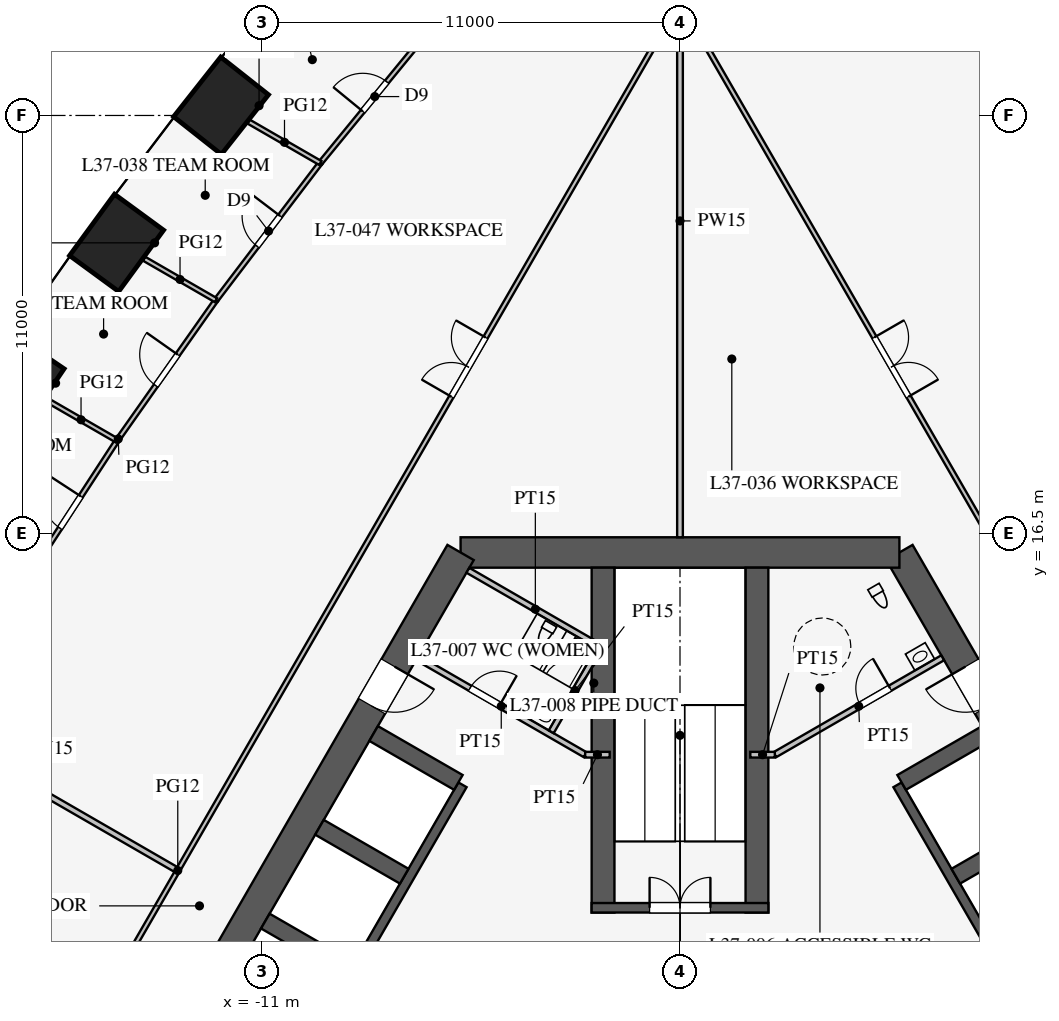
"""IFC4 building model, lengths in metres.
Left out: names, types, materials, properties, quantities, classifications, styles, units other than length and angle.
Written with IfcOpenShell. Run it as: python <this file> out.ifc"""

import sys

from ifc_helpers import new_model, si_unit, direction, frame, frame_2d, origin, origin_2d, place, context, subcontext, project, spatial, rectangle, extrude, element, fill, save


model = new_model("IFC4")
c1 = context("Model", 3, precision=1e-05, world=origin(), true_north=direction((0.0, 1.0)))
c2 = subcontext(c1, "Body", "Model", "MODEL_VIEW")
j1 = project(units=[si_unit("LENGTHUNIT", "METRE"), si_unit("PLANEANGLEUNIT", "RADIAN")], contexts=[c1])
p1 = place(None, origin())
s1 = spatial("IfcSite", under=j1, at=p1, CompositionType="ELEMENT")
p2 = place(p1, origin())
s2 = spatial("IfcBuilding", under=s1, at=p2, CompositionType="ELEMENT")
p3 = place(p2, frame((0.0, 0.0, 161.9)))
s3 = spatial("IfcBuildingStorey", under=s2, at=p3, CompositionType="ELEMENT", Elevation=161.9)
for number, where, z_axis, x_axis in (
    (1, (-12.077, 27.757, 0.0), (0.0, 0.0, 1.0), (-0.62, -0.785, 0.0)),
    (2, (-14.825, 24.148, 0.0), (0.0, 0.0, 1.0), (-0.591, -0.807, 0.0)),
    (3, (-17.43, 20.456, 0.0), (0.0, 0.0, 1.0), (-0.561, -0.828, 0.0)),
):
    element("IfcColumn", number, at=place(p3, frame(where, z_axis=z_axis, x_axis=x_axis)), inside=s3, PredefinedType="COLUMN", context=c2, shape_type="SweptSolid", body=[
        extrude(rectangle(XDim=2.0, YDim=1.6, at=origin_2d()), origin(), (0.0, 0.0, 1.0), 4.2),
    ])
p4 = place(p3, frame((16.743, -3.0, 0.0), z_axis=(0.0, 0.0, 1.0), x_axis=(-0.500002442456, 0.866023993627, 0.0)))
e4 = element("IfcWall", 4, at=p4, inside=s3, PredefinedType="SHEAR", context=c2, shape_type="SweptSolid", body=[
    extrude(rectangle(XDim=21.939, YDim=0.8, at=frame_2d((10.97, 0.0))), origin(), (0.0, 0.0, 1.0), 4.2),
])
p5 = place(p4, frame((17.27, 0.0, 0.0)))
e5 = element("IfcOpeningElement", 5, at=p5, cuts=e4, PredefinedType="OPENING", context=c2, shape_type="SweptSolid", body=[
    extrude(rectangle(XDim=1.2, YDim=2.1, at=frame_2d((0.6, 1.05))), frame((0.0, 0.41, 0.0), z_axis=(0.0, -1.0, 0.0), x_axis=(1.0, 0.0, 0.0)), (0.0, 0.0, 1.0), 0.82),
])
p6 = place(p4, frame((3.47, 0.0, 0.0)))
e6 = element("IfcOpeningElement", 6, at=p6, cuts=e4, PredefinedType="OPENING", context=c2, shape_type="SweptSolid", body=[
    extrude(rectangle(XDim=1.2, YDim=2.1, at=frame_2d((0.6, 1.05))), frame((0.0, 0.41, 0.0), z_axis=(0.0, -1.0, 0.0), x_axis=(1.0, 0.0, 0.0)), (0.0, 0.0, 1.0), 0.82),
])
p7 = place(p3, frame((5.773, 16.0, 0.0), z_axis=(0.0, 0.0, 1.0), x_axis=(-1.0, 0.0, 0.0)))
e7 = element("IfcWall", 7, at=p7, inside=s3, PredefinedType="SHEAR", context=c2, shape_type="SweptSolid", body=[
    extrude(rectangle(XDim=11.547, YDim=0.8, at=frame_2d((5.773, 0.0))), origin(), (0.0, 0.0, 1.0), 4.2),
])
p8 = place(p3, frame((-5.773, 16.0, 0.0), z_axis=(0.0, 0.0, 1.0), x_axis=(-0.500002442456, -0.866023993627, 0.0)))
e8 = element("IfcWall", 8, at=p8, inside=s3, PredefinedType="SHEAR", context=c2, shape_type="SweptSolid", body=[
    extrude(rectangle(XDim=21.939, YDim=0.8, at=frame_2d((10.97, 0.0))), origin(), (0.0, 0.0, 1.0), 4.2),
])
p9 = place(p8, frame((17.27, 0.0, 0.0)))
e9 = element("IfcOpeningElement", 9, at=p9, cuts=e8, PredefinedType="OPENING", context=c2, shape_type="SweptSolid", body=[
    extrude(rectangle(XDim=1.2, YDim=2.1, at=frame_2d((0.6, 1.05))), frame((0.0, 0.41, 0.0), z_axis=(0.0, -1.0, 0.0), x_axis=(1.0, 0.0, 0.0)), (0.0, 0.0, 1.0), 0.82),
])
p10 = place(p8, frame((3.47, 0.0, 0.0)))
e10 = element("IfcOpeningElement", 10, at=p10, cuts=e8, PredefinedType="OPENING", context=c2, shape_type="SweptSolid", body=[
    extrude(rectangle(XDim=1.2, YDim=2.1, at=frame_2d((0.6, 1.05))), frame((0.0, 0.41, 0.0), z_axis=(0.0, -1.0, 0.0), x_axis=(1.0, 0.0, 0.0)), (0.0, 0.0, 1.0), 0.82),
])
p11 = place(p3, frame((11.424, 0.014, 0.0), z_axis=(0.0, 0.0, 1.0), x_axis=(-0.500001763848, 0.866024385424, 0.0)))
e11 = element("IfcWall", 11, at=p11, inside=s3, PredefinedType="SHEAR", context=c2, shape_type="SweptSolid", body=[
    extrude(rectangle(XDim=11.4, YDim=0.25, at=frame_2d((5.7, 0.0))), origin(), (0.0, 0.0, 1.0), 4.2),
])
p12 = place(p11, frame((0.975, 0.0, 0.0)))
e12 = element("IfcOpeningElement", 12, at=p12, cuts=e11, PredefinedType="OPENING", context=c2, shape_type="SweptSolid", body=[
    extrude(rectangle(XDim=0.9, YDim=2.1, at=frame_2d((0.45, 1.05))), frame((0.0, 0.135, 0.0), z_axis=(0.0, -1.0, 0.0), x_axis=(1.0, 0.0, 0.0)), (0.0, 0.0, 1.0), 0.27),
])
p13 = place(p11, frame((3.825, 0.0, 0.0)))
e13 = element("IfcOpeningElement", 13, at=p13, cuts=e11, PredefinedType="OPENING", context=c2, shape_type="SweptSolid", body=[
    extrude(rectangle(XDim=0.9, YDim=2.1, at=frame_2d((0.45, 1.05))), frame((0.0, 0.135, 0.0), z_axis=(0.0, -1.0, 0.0), x_axis=(1.0, 0.0, 0.0)), (0.0, 0.0, 1.0), 0.27),
])
p14 = place(p3, frame((7.257, 7.481, 0.0), z_axis=(0.0, 0.0, 1.0), x_axis=(0.866046643894, 0.499963209246, 0.0)))
e14 = element("IfcWall", 14, at=p14, inside=s3, PredefinedType="SHEAR", context=c2, shape_type="SweptSolid", body=[
    extrude(rectangle(XDim=2.575, YDim=0.45, at=frame_2d((1.288, 0.0))), origin(), (0.0, 0.0, 1.0), 4.2),
])
p15 = place(p3, frame((5.832, 9.949, 0.0), z_axis=(0.0, 0.0, 1.0), x_axis=(0.866029291668, 0.499993265928, 0.0)))
e15 = element("IfcWall", 15, at=p15, inside=s3, PredefinedType="SHEAR", context=c2, shape_type="SweptSolid", body=[
    extrude(rectangle(XDim=2.575, YDim=0.45, at=frame_2d((1.288, 0.0))), origin(), (0.0, 0.0, 1.0), 4.2),
])
p16 = place(p3, frame((-5.724, 9.886, 0.0), z_axis=(0.0, 0.0, 1.0), x_axis=(-0.500001763848, -0.866024385424, 0.0)))
e16 = element("IfcWall", 16, at=p16, inside=s3, PredefinedType="SHEAR", context=c2, shape_type="SweptSolid", body=[
    extrude(rectangle(XDim=11.4, YDim=0.25, at=frame_2d((5.7, 0.0))), origin(), (0.0, 0.0, 1.0), 4.2),
])
p17 = place(p16, frame((6.525, 0.0, 0.0)))
e17 = element("IfcOpeningElement", 17, at=p17, cuts=e16, PredefinedType="OPENING", context=c2, shape_type="SweptSolid", body=[
    extrude(rectangle(XDim=1.2, YDim=2.2, at=frame_2d((0.6, 1.1))), frame((0.0, 0.135, 0.0), z_axis=(0.0, -1.0, 0.0), x_axis=(1.0, 0.0, 0.0)), (0.0, 0.0, 1.0), 0.27),
])
p18 = place(p16, frame((9.375, 0.0, 0.0)))
e18 = element("IfcOpeningElement", 18, at=p18, cuts=e16, PredefinedType="OPENING", context=c2, shape_type="SweptSolid", body=[
    extrude(rectangle(XDim=1.2, YDim=2.2, at=frame_2d((0.6, 1.1))), frame((0.0, 0.135, 0.0), z_axis=(0.0, -1.0, 0.0), x_axis=(1.0, 0.0, 0.0)), (0.0, 0.0, 1.0), 0.27),
])
p19 = place(p3, frame((-5.832, 9.949, 0.0), z_axis=(0.0, 0.0, 1.0), x_axis=(-0.866029291668, 0.499993265928, 0.0)))
e19 = element("IfcWall", 19, at=p19, inside=s3, PredefinedType="SHEAR", context=c2, shape_type="SweptSolid", body=[
    extrude(rectangle(XDim=2.575, YDim=0.45, at=frame_2d((1.288, 0.0))), origin(), (0.0, 0.0, 1.0), 4.2),
])
for number, where, z_axis, x_axis in (
    (20, (-7.257, 7.481, 0.0), (0.0, 0.0, 1.0), (-0.866, 0.5, 0.0)),
    (21, (-8.682, 5.012, 0.0), (0.0, 0.0, 1.0), (-0.866, 0.5, 0.0)),
):
    element("IfcWall", number, at=place(p3, frame(where, z_axis=z_axis, x_axis=x_axis)), inside=s3, PredefinedType="SHEAR", context=c2, shape_type="SweptSolid", body=[
        extrude(rectangle(XDim=2.575, YDim=0.45, at=frame_2d((1.288, 0.0))), origin(), (0.0, 0.0, 1.0), 4.2),
    ])
for number, where, z_axis, x_axis in (
    (22, (2.025, 6.525, 0.0), (0.0, 0.0, 1.0), (0.0, 1.0, 0.0)),
    (23, (-2.025, 6.525, 0.0), (0.0, 0.0, 1.0), (0.0, 1.0, 0.0)),
):
    element("IfcWall", number, at=place(p3, frame(where, z_axis=z_axis, x_axis=x_axis)), inside=s3, PredefinedType="SHEAR", context=c2, shape_type="SweptSolid", body=[
        extrude(rectangle(XDim=9.075, YDim=0.6, at=frame_2d((4.538, 0.0))), origin(), (0.0, 0.0, 1.0), 4.2),
    ])
p20 = place(p3, frame((2.325, 6.65, 0.0), z_axis=(0.0, 0.0, 1.0), x_axis=(-1.0, 0.0, 0.0)))
e24 = element("IfcWall", 24, at=p20, inside=s3, PredefinedType="SHEAR", context=c2, shape_type="SweptSolid", body=[
    extrude(rectangle(XDim=4.65, YDim=0.25, at=frame_2d((2.325, 0.0))), origin(), (0.0, 0.0, 1.0), 4.2),
])
p21 = place(p20, frame((1.525, 0.0, 0.0)))
e25 = element("IfcOpeningElement", 25, at=p21, cuts=e24, PredefinedType="OPENING", context=c2, shape_type="SweptSolid", body=[
    extrude(rectangle(XDim=1.6, YDim=2.1, at=frame_2d((0.8, 1.05))), frame((0.0, 0.135, 0.0), z_axis=(0.0, -1.0, 0.0), x_axis=(1.0, 0.0, 0.0)), (0.0, 0.0, 1.0), 0.27),
])
p22 = place(p3, frame((2.495, 10.678, 0.0), z_axis=(0.0, 0.0, 1.0), x_axis=(0.86602216432, 0.500005610874, 0.0)))
e26 = element("IfcWall", 26, at=p22, inside=s3, PredefinedType="PARTITIONING", context=c2, shape_type="SweptSolid", body=[
    extrude(rectangle(XDim=5.1, YDim=0.15, at=frame_2d((2.55, 0.0))), origin(), (0.0, 0.0, 1.0), 4.0),
])
p23 = place(p22, frame((2.6, 0.0, 0.0)))
e27 = element("IfcOpeningElement", 27, at=p23, cuts=e26, PredefinedType="OPENING", context=c2, shape_type="SweptSolid", body=[
    extrude(rectangle(XDim=0.9, YDim=2.1, at=frame_2d((0.45, 1.05))), frame((0.0, 0.085, 0.0), z_axis=(0.0, -1.0, 0.0), x_axis=(1.0, 0.0, 0.0)), (0.0, 0.0, 1.0), 0.17),
])
p24 = place(p3, frame((-2.495, 10.678, 0.0), z_axis=(0.0, 0.0, 1.0), x_axis=(-0.86602216432, 0.500005610874, 0.0)))
e28 = element("IfcWall", 28, at=p24, inside=s3, PredefinedType="PARTITIONING", context=c2, shape_type="SweptSolid", body=[
    extrude(rectangle(XDim=5.1, YDim=0.15, at=frame_2d((2.55, 0.0))), origin(), (0.0, 0.0, 1.0), 4.0),
])
p25 = place(p24, frame((2.6, 0.0, 0.0)))
e29 = element("IfcOpeningElement", 29, at=p25, cuts=e28, PredefinedType="OPENING", context=c2, shape_type="SweptSolid", body=[
    extrude(rectangle(XDim=0.9, YDim=2.1, at=frame_2d((0.45, 1.05))), frame((0.0, 0.085, 0.0), z_axis=(0.0, -1.0, 0.0), x_axis=(1.0, 0.0, 0.0)), (0.0, 0.0, 1.0), 0.17),
])
for number, where, z_axis, x_axis in (
    (30, (2.495, 10.678, 0.0), (0.0, 0.0, 1.0), (-1.0, 0.0, 0.0)),
    (31, (-2.495, 10.678, 0.0), (0.0, 0.0, 1.0), (1.0, 0.0, 0.0)),
):
    element("IfcWall", number, at=place(p3, frame(where, z_axis=z_axis, x_axis=x_axis)), inside=s3, PredefinedType="PARTITIONING", context=c2, shape_type="SweptSolid", body=[
        extrude(rectangle(XDim=0.645, YDim=0.15, at=frame_2d((0.323, 0.0))), origin(), (0.0, 0.0, 1.0), 4.0),
    ])
p26 = place(p3, frame((-2.031, 13.482, 0.0), z_axis=(0.0, 0.0, 1.0), x_axis=(-0.866050731258, 0.499956128963, 0.0)))
e32 = element("IfcWall", 32, at=p26, inside=s3, PredefinedType="PARTITIONING", context=c2, shape_type="SweptSolid", body=[
    extrude(rectangle(XDim=4.1, YDim=0.15, at=frame_2d((2.05, 0.0))), origin(), (0.0, 0.0, 1.0), 4.0),
])
p27 = place(p3, frame((-3.389, 11.281, 0.0), z_axis=(0.0, 0.0, 1.0), x_axis=(0.499989096993, 0.866031698547, 0.0)))
e33 = element("IfcWall", 33, at=p27, inside=s3, PredefinedType="PARTITIONING", context=c2, shape_type="SweptSolid", body=[
    extrude(rectangle(XDim=2.51, YDim=0.15, at=frame_2d((1.255, 0.0))), origin(), (0.0, 0.0, 1.0), 4.0),
])
p28 = place(p3, frame((0.0, 16.4, 0.0), z_axis=(0.0, 0.0, 1.0), x_axis=(0.0, 1.0, 0.0)))
e34 = element("IfcWall", 34, at=p28, inside=s3, PredefinedType="PARTITIONING", context=c2, shape_type="SweptSolid", body=[
    extrude(rectangle(XDim=16.65, YDim=0.15, at=frame_2d((8.325, 0.0))), origin(), (0.0, 0.0, 1.0), 2.3),
])
p29 = place(p3, frame((26.415, -15.231, 0.0), z_axis=(0.0, 0.0, 1.0), x_axis=(-0.50000091641, 0.866024874695, 0.0)))
e35 = element("IfcWall", 35, at=p29, inside=s3, PredefinedType="PARTITIONING", context=c2, shape_type="SweptSolid", body=[
    extrude(rectangle(XDim=52.796, YDim=0.12, at=frame_2d((26.398, 0.0))), origin(), (0.0, 0.0, 1.0), 2.9),
])
p30 = place(p29, frame((10.2, 0.0, 0.15)))
e36 = element("IfcOpeningElement", 36, at=p30, cuts=e35, PredefinedType="OPENING", context=c2, shape_type="SweptSolid", body=[
    extrude(rectangle(XDim=1.8, YDim=2.1, at=frame_2d((0.9, 1.05))), frame((0.0, 0.07, 0.0), z_axis=(0.0, -1.0, 0.0), x_axis=(1.0, 0.0, 0.0)), (0.0, 0.0, 1.0), 0.14),
])
p31 = place(p29, frame((40.8, 0.0, 0.15)))
e37 = element("IfcOpeningElement", 37, at=p31, cuts=e35, PredefinedType="OPENING", context=c2, shape_type="SweptSolid", body=[
    extrude(rectangle(XDim=1.8, YDim=2.1, at=frame_2d((0.9, 1.05))), frame((0.0, 0.07, 0.0), z_axis=(0.0, -1.0, 0.0), x_axis=(1.0, 0.0, 0.0)), (0.0, 0.0, 1.0), 0.14),
])
p32 = place(p3, frame((-13.268, 7.66, 0.0), z_axis=(0.0, 0.0, 1.0), x_axis=(-0.866013963754, 0.500019814191, 0.0)))
e38 = element("IfcWall", 38, at=p32, inside=s3, PredefinedType="PARTITIONING", context=c2, shape_type="SweptSolid", body=[
    extrude(rectangle(XDim=9.5, YDim=0.15, at=frame_2d((4.75, 0.0))), origin(), (0.0, 0.0, 1.0), 2.8),
])
p33 = place(p3, frame((-0.016, 30.491, 0.0), z_axis=(0.0, 0.0, 1.0), x_axis=(-0.50000091641, -0.866024874695, 0.0)))
e39 = element("IfcWall", 39, at=p33, inside=s3, PredefinedType="PARTITIONING", context=c2, shape_type="SweptSolid", body=[
    extrude(rectangle(XDim=52.796, YDim=0.12, at=frame_2d((26.398, 0.0))), origin(), (0.0, 0.0, 1.0), 2.9),
])
p34 = place(p33, frame((10.2, 0.0, 0.15)))
e40 = element("IfcOpeningElement", 40, at=p34, cuts=e39, PredefinedType="OPENING", context=c2, shape_type="SweptSolid", body=[
    extrude(rectangle(XDim=1.8, YDim=2.1, at=frame_2d((0.9, 1.05))), frame((0.0, 0.07, 0.0), z_axis=(0.0, -1.0, 0.0), x_axis=(1.0, 0.0, 0.0)), (0.0, 0.0, 1.0), 0.14),
])
p35 = place(p33, frame((40.8, 0.0, 0.15)))
e41 = element("IfcOpeningElement", 41, at=p35, cuts=e39, PredefinedType="OPENING", context=c2, shape_type="SweptSolid", body=[
    extrude(rectangle(XDim=1.8, YDim=2.1, at=frame_2d((0.9, 1.05))), frame((0.0, 0.07, 0.0), z_axis=(0.0, -1.0, 0.0), x_axis=(1.0, 0.0, 0.0)), (0.0, 0.0, 1.0), 0.14),
])
p36 = place(p3, frame((-12.21, 22.638, 0.0), z_axis=(0.0, 0.0, 1.0), x_axis=(-0.575987178736, -0.817458726745, 0.0)))
e42 = element("IfcWall", 42, at=p36, inside=s3, PredefinedType="PARTITIONING", context=c2, shape_type="SweptSolid", body=[
    extrude(rectangle(XDim=4.518, YDim=0.12, at=frame_2d((2.259, 0.0))), origin(), (0.0, 0.0, 1.0), 2.9),
])
p37 = place(p36, frame((1.75, 0.0, 0.15)))
e43 = element("IfcOpeningElement", 43, at=p37, cuts=e42, PredefinedType="OPENING", context=c2, shape_type="SweptSolid", body=[
    extrude(rectangle(XDim=1.0, YDim=2.1, at=frame_2d((0.5, 1.05))), frame((0.0, 0.07, 0.0), z_axis=(0.0, -1.0, 0.0), x_axis=(1.0, 0.0, 0.0)), (0.0, 0.0, 1.0), 0.14),
])
p38 = place(p3, frame((-9.464, 26.249, 0.0), z_axis=(0.0, 0.0, 1.0), x_axis=(-0.605248368565, -0.796036690329, 0.0)))
e44 = element("IfcWall", 44, at=p38, inside=s3, PredefinedType="PARTITIONING", context=c2, shape_type="SweptSolid", body=[
    extrude(rectangle(XDim=4.536, YDim=0.12, at=frame_2d((2.268, 0.0))), origin(), (0.0, 0.0, 1.0), 2.9),
])
p39 = place(p38, frame((1.75, 0.0, 0.15)))
e45 = element("IfcOpeningElement", 45, at=p39, cuts=e44, PredefinedType="OPENING", context=c2, shape_type="SweptSolid", body=[
    extrude(rectangle(XDim=1.0, YDim=2.1, at=frame_2d((0.5, 1.05))), frame((0.0, 0.07, 0.0), z_axis=(0.0, -1.0, 0.0), x_axis=(1.0, 0.0, 0.0)), (0.0, 0.0, 1.0), 0.14),
])
p40 = place(p3, frame((-6.573, 29.776, 0.0), z_axis=(0.0, 0.0, 1.0), x_axis=(-0.633843962561, -0.773460943503, 0.0)))
e46 = element("IfcWall", 46, at=p40, inside=s3, PredefinedType="PARTITIONING", context=c2, shape_type="SweptSolid", body=[
    extrude(rectangle(XDim=4.561, YDim=0.12, at=frame_2d((2.28, 0.0))), origin(), (0.0, 0.0, 1.0), 2.9),
])
p41 = place(p40, frame((1.8, 0.0, 0.15)))
e47 = element("IfcOpeningElement", 47, at=p41, cuts=e46, PredefinedType="OPENING", context=c2, shape_type="SweptSolid", body=[
    extrude(rectangle(XDim=1.0, YDim=2.1, at=frame_2d((0.5, 1.05))), frame((0.0, 0.07, 0.0), z_axis=(0.0, -1.0, 0.0), x_axis=(1.0, 0.0, 0.0)), (0.0, 0.0, 1.0), 0.14),
])
p42 = place(p3, frame((-14.812, 18.944, 0.0), z_axis=(0.0, 0.0, 1.0), x_axis=(-0.546094247499, -0.837723744948, 0.0)))
e48 = element("IfcWall", 48, at=p42, inside=s3, PredefinedType="PARTITIONING", context=c2, shape_type="SweptSolid", body=[
    extrude(rectangle(XDim=4.506, YDim=0.12, at=frame_2d((2.253, 0.0))), origin(), (0.0, 0.0, 1.0), 2.9),
])
p43 = place(p42, frame((1.75, 0.0, 0.15)))
e49 = element("IfcOpeningElement", 49, at=p43, cuts=e48, PredefinedType="OPENING", context=c2, shape_type="SweptSolid", body=[
    extrude(rectangle(XDim=1.0, YDim=2.1, at=frame_2d((0.5, 1.05))), frame((0.0, 0.07, 0.0), z_axis=(0.0, -1.0, 0.0), x_axis=(1.0, 0.0, 0.0)), (0.0, 0.0, 1.0), 0.14),
])
p44 = place(p3, frame((-12.21, 22.638, 0.0), z_axis=(0.0, 0.0, 1.0), x_axis=(-0.866006986733, 0.500031897912, 0.0)))
e50 = element("IfcWall", 50, at=p44, inside=s3, PredefinedType="PARTITIONING", context=c2, shape_type="SweptSolid", body=[
    extrude(rectangle(XDim=2.185, YDim=0.12, at=frame_2d((1.093, 0.0))), origin(), (0.0, 0.0, 1.0), 2.6),
])
p45 = place(p3, frame((-9.464, 26.249, 0.0), z_axis=(0.0, 0.0, 1.0), x_axis=(-0.866054922749, 0.499948868167, 0.0)))
e51 = element("IfcWall", 51, at=p45, inside=s3, PredefinedType="PARTITIONING", context=c2, shape_type="SweptSolid", body=[
    extrude(rectangle(XDim=2.178, YDim=0.12, at=frame_2d((1.089, 0.0))), origin(), (0.0, 0.0, 1.0), 2.8),
])
p46 = place(p3, frame((-14.812, 18.944, 0.0), z_axis=(0.0, 0.0, 1.0), x_axis=(-0.866005567398, 0.500034356056, 0.0)))
e52 = element("IfcWall", 52, at=p46, inside=s3, PredefinedType="PARTITIONING", context=c2, shape_type="SweptSolid", body=[
    extrude(rectangle(XDim=2.191, YDim=0.12, at=frame_2d((1.095, 0.0))), origin(), (0.0, 0.0, 1.0), 2.9),
])
p47 = place(p23, origin())
e53 = element("IfcDoor", 53, at=p47, inside=s3, OperationType="SINGLE_SWING_RIGHT", PredefinedType="DOOR", context=c2, shape_type="SweptSolid", body=[
    extrude(rectangle(XDim=0.9, YDim=2.1, at=frame_2d((0.45, 1.05))), frame((0.0, 0.025, 0.0), z_axis=(0.0, -1.0, 0.0), x_axis=(1.0, 0.0, 0.0)), (0.0, 0.0, 1.0), 0.05),
])
fill(e27, e53)
p48 = place(p25, frame((0.9, 0.0, 0.0), z_axis=(0.0, 0.0, 1.0), x_axis=(-1.0, 0.0, 0.0)))
e54 = element("IfcDoor", 54, at=p48, inside=s3, OperationType="SINGLE_SWING_RIGHT", PredefinedType="DOOR", context=c2, shape_type="SweptSolid", body=[
    extrude(rectangle(XDim=0.9, YDim=2.1, at=frame_2d((0.45, 1.05))), frame((0.0, 0.025, 0.0), z_axis=(0.0, -1.0, 0.0), x_axis=(1.0, 0.0, 0.0)), (0.0, 0.0, 1.0), 0.05),
])
fill(e29, e54)
p49 = place(p21, frame((1.6, 0.0, 0.0), z_axis=(0.0, 0.0, 1.0), x_axis=(-1.0, 0.0, 0.0)))
e55 = element("IfcDoor", 55, at=p49, inside=s3, OperationType="DOUBLE_DOOR_SINGLE_SWING", PredefinedType="DOOR", context=c2, shape_type="SweptSolid", body=[
    extrude(rectangle(XDim=1.6, YDim=2.1, at=frame_2d((0.8, 1.05))), frame((0.0, 0.025, 0.0), z_axis=(0.0, -1.0, 0.0), x_axis=(1.0, 0.0, 0.0)), (0.0, 0.0, 1.0), 0.05),
])
fill(e25, e55)
p50 = place(p5, origin())
e56 = element("IfcDoor", 56, at=p50, inside=s3, OperationType="SINGLE_SWING_RIGHT", PredefinedType="DOOR", context=c2, shape_type="SweptSolid", body=[
    extrude(rectangle(XDim=1.2, YDim=2.1, at=frame_2d((0.6, 1.05))), frame((0.0, 0.025, 0.0), z_axis=(0.0, -1.0, 0.0), x_axis=(1.0, 0.0, 0.0)), (0.0, 0.0, 1.0), 0.05),
])
fill(e5, e56)
p51 = place(p10, origin())
e57 = element("IfcDoor", 57, at=p51, inside=s3, OperationType="SINGLE_SWING_LEFT", PredefinedType="DOOR", context=c2, shape_type="SweptSolid", body=[
    extrude(rectangle(XDim=1.2, YDim=2.1, at=frame_2d((0.6, 1.05))), frame((0.0, 0.025, 0.0), z_axis=(0.0, -1.0, 0.0), x_axis=(1.0, 0.0, 0.0)), (0.0, 0.0, 1.0), 0.05),
])
fill(e10, e57)
p52 = place(p31, frame((1.8, 0.0, 0.0), z_axis=(0.0, 0.0, 1.0), x_axis=(-1.0, 0.0, 0.0)))
e58 = element("IfcDoor", 58, at=p52, inside=s3, OperationType="DOUBLE_DOOR_SINGLE_SWING", PredefinedType="DOOR", context=c2, shape_type="SweptSolid", body=[
    extrude(rectangle(XDim=1.8, YDim=2.1, at=frame_2d((0.9, 1.05))), frame((0.0, 0.025, 0.0), z_axis=(0.0, -1.0, 0.0), x_axis=(1.0, 0.0, 0.0)), (0.0, 0.0, 1.0), 0.05),
])
fill(e37, e58)
p53 = place(p41, frame((1.0, 0.0, 0.0), z_axis=(0.0, 0.0, 1.0), x_axis=(-1.0, 0.0, 0.0)))
e59 = element("IfcDoor", 59, at=p53, inside=s3, OperationType="SINGLE_SWING_LEFT", PredefinedType="DOOR", context=c2, shape_type="SweptSolid", body=[
    extrude(rectangle(XDim=1.0, YDim=2.1, at=frame_2d((0.5, 1.05))), frame((0.0, 0.025, 0.0), z_axis=(0.0, -1.0, 0.0), x_axis=(1.0, 0.0, 0.0)), (0.0, 0.0, 1.0), 0.05),
])
fill(e47, e59)
p54 = place(p39, frame((1.0, 0.0, 0.0), z_axis=(0.0, 0.0, 1.0), x_axis=(-1.0, 0.0, 0.0)))
e60 = element("IfcDoor", 60, at=p54, inside=s3, OperationType="SINGLE_SWING_RIGHT", PredefinedType="DOOR", context=c2, shape_type="SweptSolid", body=[
    extrude(rectangle(XDim=1.0, YDim=2.1, at=frame_2d((0.5, 1.05))), frame((0.0, 0.025, 0.0), z_axis=(0.0, -1.0, 0.0), x_axis=(1.0, 0.0, 0.0)), (0.0, 0.0, 1.0), 0.05),
])
fill(e45, e60)
p55 = place(p37, frame((1.0, 0.0, 0.0), z_axis=(0.0, 0.0, 1.0), x_axis=(-1.0, 0.0, 0.0)))
e61 = element("IfcDoor", 61, at=p55, inside=s3, OperationType="SINGLE_SWING_RIGHT", PredefinedType="DOOR", context=c2, shape_type="SweptSolid", body=[
    extrude(rectangle(XDim=1.0, YDim=2.1, at=frame_2d((0.5, 1.05))), frame((0.0, 0.025, 0.0), z_axis=(0.0, -1.0, 0.0), x_axis=(1.0, 0.0, 0.0)), (0.0, 0.0, 1.0), 0.05),
])
fill(e43, e61)
p56 = place(p43, frame((1.0, 0.0, 0.0), z_axis=(0.0, 0.0, 1.0), x_axis=(-1.0, 0.0, 0.0)))
e62 = element("IfcDoor", 62, at=p56, inside=s3, OperationType="SINGLE_SWING_RIGHT", PredefinedType="DOOR", context=c2, shape_type="SweptSolid", body=[
    extrude(rectangle(XDim=1.0, YDim=2.1, at=frame_2d((0.5, 1.05))), frame((0.0, 0.025, 0.0), z_axis=(0.0, -1.0, 0.0), x_axis=(1.0, 0.0, 0.0)), (0.0, 0.0, 1.0), 0.05),
])
fill(e49, e62)
p57 = place(p34, frame((1.8, 0.0, 0.0), z_axis=(0.0, 0.0, 1.0), x_axis=(-1.0, 0.0, 0.0)))
e63 = element("IfcDoor", 63, at=p57, inside=s3, OperationType="DOUBLE_DOOR_SINGLE_SWING", PredefinedType="DOOR", context=c2, shape_type="SweptSolid", body=[
    extrude(rectangle(XDim=1.8, YDim=2.1, at=frame_2d((0.9, 1.05))), frame((0.0, 0.025, 0.0), z_axis=(0.0, -1.0, 0.0), x_axis=(1.0, 0.0, 0.0)), (0.0, 0.0, 1.0), 0.05),
])
fill(e40, e63)
save(model, sys.argv[1])
